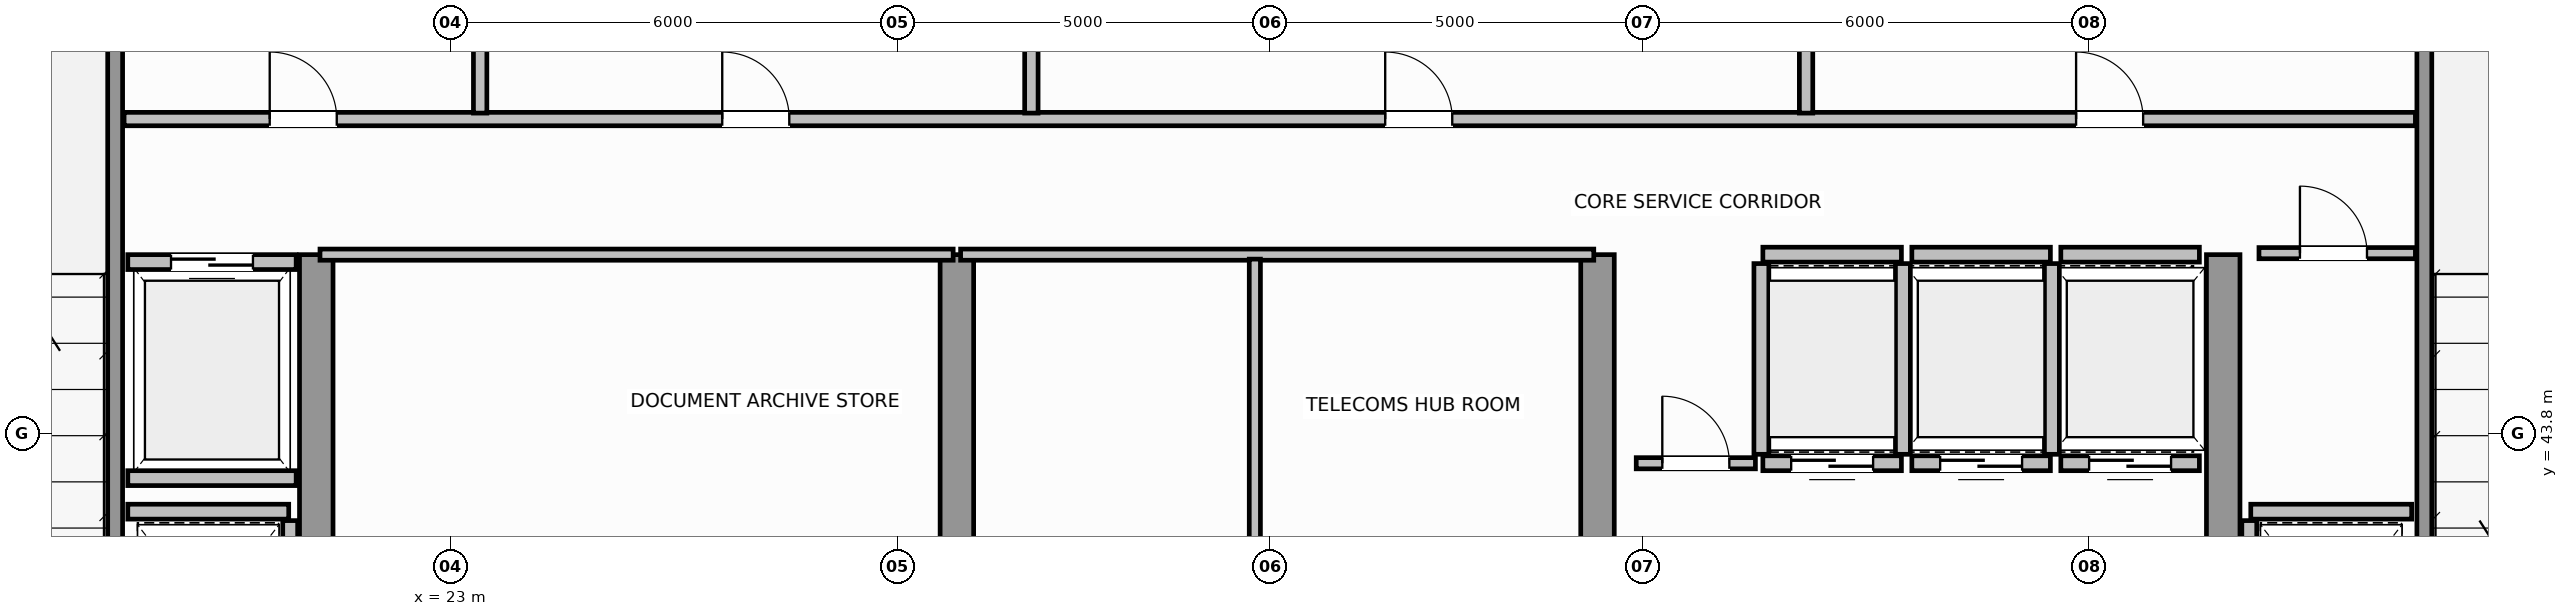
"""IFC4 building model, lengths in metres.
Left out: names, types, materials, properties, quantities, classifications, styles, units other than length and angle.
Written with IfcOpenShell. Run it as: python <this file> out.ifc"""

import sys

from ifc_helpers import new_model, si_unit, direction, frame, frame_2d, origin, place, context, subcontext, project, spatial, rectangle, extrude, source, transform, mapped, element, fill, save


model = new_model("IFC4")
c1 = context("Model", 3, precision=1e-05, world=origin(), true_north=direction((0.0, 1.0)))
c2 = subcontext(c1, "Body", "Model", "MODEL_VIEW")
j1 = project(units=[si_unit("LENGTHUNIT", "METRE"), si_unit("PLANEANGLEUNIT", "RADIAN")], contexts=[c1])
p1 = place(None, origin())
s1 = spatial("IfcSite", under=j1, at=p1, CompositionType="ELEMENT")
p2 = place(p1, origin())
s2 = spatial("IfcBuilding", under=s1, at=p2, CompositionType="ELEMENT")
p3 = place(p2, frame((0.0, 0.0, 299.2)))
s3 = spatial("IfcBuildingStorey", under=s2, at=p3, CompositionType="ELEMENT", Elevation=299.2)
for number, where, z_axis, x_axis in (
    (1, (21.2, 36.745, 0.0), (0.0, 0.0, 1.0), (0.0, 1.0, 0.0)),
    (2, (29.8, 36.745, 0.0), (0.0, 0.0, 1.0), (0.0, 1.0, 0.0)),
    (3, (38.4, 36.745, 0.0), (0.0, 0.0, 1.0), (0.0, 1.0, 0.0)),
    (4, (46.8, 36.745, 0.0), (0.0, 0.0, 1.0), (0.0, 1.0, 0.0)),
):
    element("IfcWall", number, at=place(p3, frame(where, z_axis=z_axis, x_axis=x_axis)), inside=s3, PredefinedType="SHEAR", context=c2, shape_type="SweptSolid", body=[
        extrude(rectangle(XDim=9.455, YDim=0.45, at=frame_2d((4.728, 0.0))), origin(), (0.0, 0.0, 1.0), 4.6),
    ])
for number, where, z_axis, x_axis in (
    (5, (18.5, 39.96, 0.0), (0.0, 0.0, 1.0), (0.0, 1.0, 0.0)),
    (6, (49.5, 39.96, 0.0), (0.0, 0.0, 1.0), (0.0, 1.0, 0.0)),
):
    element("IfcWall", number, at=place(p3, frame(where, z_axis=z_axis, x_axis=x_axis)), inside=s3, PredefinedType="SOLIDWALL", context=c2, shape_type="SweptSolid", body=[
        extrude(rectangle(XDim=9.93, YDim=0.2, at=frame_2d((4.965, 0.0))), origin(), (0.0, 0.0, 1.0), 4.6),
    ])
p4 = place(p3, frame((40.62, 43.4, 0.0), z_axis=(0.0, 0.0, 1.0), x_axis=(1.0, 0.0, 0.0)))
e7 = element("IfcWall", 7, at=p4, inside=s3, PredefinedType="SOLIDWALL", context=c2, shape_type="SweptSolid", body=[
    extrude(rectangle(XDim=1.86, YDim=0.2, at=frame_2d((0.93, 0.0))), origin(), (0.0, 0.0, 1.0), 4.3),
])
p5 = place(p4, frame((0.38, 0.0, 0.0)))
e8 = element("IfcOpeningElement", 8, at=p5, cuts=e7, PredefinedType="OPENING", context=c2, shape_type="SweptSolid", body=[
    extrude(rectangle(XDim=1.1, YDim=2.15, at=frame_2d((0.55, 1.075))), frame((0.0, 0.11, 0.0), z_axis=(0.0, -1.0, 0.0), x_axis=(1.0, 0.0, 0.0)), (0.0, 0.0, 1.0), 0.22),
])
p6 = place(p3, frame((40.62, 46.2, 0.0), z_axis=(0.0, 0.0, 1.0), x_axis=(1.0, 0.0, 0.0)))
e9 = element("IfcWall", 9, at=p6, inside=s3, PredefinedType="SOLIDWALL", context=c2, shape_type="SweptSolid", body=[
    extrude(rectangle(XDim=1.86, YDim=0.2, at=frame_2d((0.93, 0.0))), origin(), (0.0, 0.0, 1.0), 4.3),
])
for number, where, z_axis, x_axis in (
    (10, (40.6, 43.52, 0.0), (0.0, 0.0, 1.0), (0.0, 1.0, 0.0)),
    (11, (42.5, 43.52, 0.0), (0.0, 0.0, 1.0), (0.0, 1.0, 0.0)),
):
    element("IfcWall", number, at=place(p3, frame(where, z_axis=z_axis, x_axis=x_axis)), inside=s3, PredefinedType="SOLIDWALL", context=c2, shape_type="SweptSolid", body=[
        extrude(rectangle(XDim=2.56, YDim=0.2, at=frame_2d((1.28, 0.0))), origin(), (0.0, 0.0, 1.0), 4.3),
    ])
p7 = place(p3, frame((42.62, 43.4, 0.0), z_axis=(0.0, 0.0, 1.0), x_axis=(1.0, 0.0, 0.0)))
e12 = element("IfcWall", 12, at=p7, inside=s3, PredefinedType="SOLIDWALL", context=c2, shape_type="SweptSolid", body=[
    extrude(rectangle(XDim=1.86, YDim=0.2, at=frame_2d((0.93, 0.0))), origin(), (0.0, 0.0, 1.0), 4.3),
])
p8 = place(p7, frame((0.38, 0.0, 0.0)))
e13 = element("IfcOpeningElement", 13, at=p8, cuts=e12, PredefinedType="OPENING", context=c2, shape_type="SweptSolid", body=[
    extrude(rectangle(XDim=1.1, YDim=2.15, at=frame_2d((0.55, 1.075))), frame((0.0, 0.11, 0.0), z_axis=(0.0, -1.0, 0.0), x_axis=(1.0, 0.0, 0.0)), (0.0, 0.0, 1.0), 0.22),
])
p9 = place(p3, frame((42.62, 46.2, 0.0), z_axis=(0.0, 0.0, 1.0), x_axis=(1.0, 0.0, 0.0)))
e14 = element("IfcWall", 14, at=p9, inside=s3, PredefinedType="SOLIDWALL", context=c2, shape_type="SweptSolid", body=[
    extrude(rectangle(XDim=1.86, YDim=0.2, at=frame_2d((0.93, 0.0))), origin(), (0.0, 0.0, 1.0), 4.3),
])
p10 = place(p3, frame((44.5, 43.52, 0.0), z_axis=(0.0, 0.0, 1.0), x_axis=(0.0, 1.0, 0.0)))
e15 = element("IfcWall", 15, at=p10, inside=s3, PredefinedType="SOLIDWALL", context=c2, shape_type="SweptSolid", body=[
    extrude(rectangle(XDim=2.56, YDim=0.2, at=frame_2d((1.28, 0.0))), origin(), (0.0, 0.0, 1.0), 3.09),
])
p11 = place(p3, frame((44.62, 43.4, 0.0), z_axis=(0.0, 0.0, 1.0), x_axis=(1.0, 0.0, 0.0)))
e16 = element("IfcWall", 16, at=p11, inside=s3, PredefinedType="SOLIDWALL", context=c2, shape_type="SweptSolid", body=[
    extrude(rectangle(XDim=1.86, YDim=0.2, at=frame_2d((0.93, 0.0))), origin(), (0.0, 0.0, 1.0), 4.3),
])
p12 = place(p11, frame((0.38, 0.0, 0.0)))
e17 = element("IfcOpeningElement", 17, at=p12, cuts=e16, PredefinedType="OPENING", context=c2, shape_type="SweptSolid", body=[
    extrude(rectangle(XDim=1.1, YDim=2.15, at=frame_2d((0.55, 1.075))), frame((0.0, 0.11, 0.0), z_axis=(0.0, -1.0, 0.0), x_axis=(1.0, 0.0, 0.0)), (0.0, 0.0, 1.0), 0.22),
])
p13 = place(p3, frame((44.62, 46.2, 0.0), z_axis=(0.0, 0.0, 1.0), x_axis=(1.0, 0.0, 0.0)))
e18 = element("IfcWall", 18, at=p13, inside=s3, PredefinedType="SOLIDWALL", context=c2, shape_type="SweptSolid", body=[
    extrude(rectangle(XDim=1.86, YDim=0.2, at=frame_2d((0.93, 0.0))), origin(), (0.0, 0.0, 1.0), 4.3),
])
p14 = place(p3, frame((18.67, 46.1, 0.0), z_axis=(0.0, 0.0, 1.0), x_axis=(1.0, 0.0, 0.0)))
e19 = element("IfcWall", 19, at=p14, inside=s3, PredefinedType="SOLIDWALL", context=c2, shape_type="SweptSolid", body=[
    extrude(rectangle(XDim=2.26, YDim=0.2, at=frame_2d((1.13, 0.0))), origin(), (0.0, 0.0, 1.0), 4.3),
])
p15 = place(p14, frame((0.58, 0.0, 0.0)))
e20 = element("IfcOpeningElement", 20, at=p15, cuts=e19, PredefinedType="OPENING", context=c2, shape_type="SweptSolid", body=[
    extrude(rectangle(XDim=1.1, YDim=2.15, at=frame_2d((0.55, 1.075))), frame((0.0, 0.11, 0.0), z_axis=(0.0, -1.0, 0.0), x_axis=(1.0, 0.0, 0.0)), (0.0, 0.0, 1.0), 0.22),
])
p16 = place(p3, frame((18.67, 43.2, 0.0), z_axis=(0.0, 0.0, 1.0), x_axis=(1.0, 0.0, 0.0)))
e21 = element("IfcWall", 21, at=p16, inside=s3, PredefinedType="SOLIDWALL", context=c2, shape_type="SweptSolid", body=[
    extrude(rectangle(XDim=2.26, YDim=0.2, at=frame_2d((1.13, 0.0))), origin(), (0.0, 0.0, 1.0), 4.3),
])
p17 = place(p3, frame((18.67, 42.75, 0.0), z_axis=(0.0, 0.0, 1.0), x_axis=(1.0, 0.0, 0.0)))
e22 = element("IfcWall", 22, at=p17, inside=s3, PredefinedType="SOLIDWALL", context=c2, shape_type="SweptSolid", body=[
    extrude(rectangle(XDim=2.16, YDim=0.2, at=frame_2d((1.08, 0.0))), origin(), (0.0, 0.0, 1.0), 4.3),
])
p18 = place(p3, frame((20.85, 40.07, 0.0), z_axis=(0.0, 0.0, 1.0), x_axis=(0.0, 1.0, 0.0)))
e23 = element("IfcWall", 23, at=p18, inside=s3, PredefinedType="SOLIDWALL", context=c2, shape_type="SweptSolid", body=[
    extrude(rectangle(XDim=2.56, YDim=0.2, at=frame_2d((1.28, 0.0))), origin(), (0.0, 0.0, 1.0), 4.3),
])
p19 = place(p3, frame((47.17, 42.75, 0.0), z_axis=(0.0, 0.0, 1.0), x_axis=(1.0, 0.0, 0.0)))
e24 = element("IfcWall", 24, at=p19, inside=s3, PredefinedType="SOLIDWALL", context=c2, shape_type="SweptSolid", body=[
    extrude(rectangle(XDim=2.16, YDim=0.2, at=frame_2d((1.08, 0.0))), origin(), (0.0, 0.0, 1.0), 4.3),
])
p20 = place(p3, frame((47.15, 40.07, 0.0), z_axis=(0.0, 0.0, 1.0), x_axis=(0.0, 1.0, 0.0)))
e25 = element("IfcWall", 25, at=p20, inside=s3, PredefinedType="SOLIDWALL", context=c2, shape_type="SweptSolid", body=[
    extrude(rectangle(XDim=2.56, YDim=0.2, at=frame_2d((1.28, 0.0))), origin(), (0.0, 0.0, 1.0), 4.3),
])
for number, where, z_axis, x_axis in (
    (26, (21.25, 46.2, 0.0), (0.0, 0.0, 1.0), (1.0, 0.0, 0.0)),
    (27, (29.85, 46.2, 0.0), (0.0, 0.0, 1.0), (1.0, 0.0, 0.0)),
):
    element("IfcWall", number, at=place(p3, frame(where, z_axis=z_axis, x_axis=x_axis)), inside=s3, PredefinedType="PARTITIONING", context=c2, shape_type="SweptSolid", body=[
        extrude(rectangle(XDim=8.5, YDim=0.15, at=frame_2d((4.25, 0.0))), origin(), (0.0, 0.0, 1.0), 4.3),
    ])
p21 = place(p3, frame((33.8, 36.56, 0.0), z_axis=(0.0, 0.0, 1.0), x_axis=(0.0, 1.0, 0.0)))
e28 = element("IfcWall", 28, at=p21, inside=s3, PredefinedType="PARTITIONING", context=c2, shape_type="SweptSolid", body=[
    extrude(rectangle(XDim=9.58, YDim=0.15, at=frame_2d((4.79, 0.0))), origin(), (0.0, 0.0, 1.0), 4.3),
])
p22 = place(p21, frame((4.2, 0.0, 0.0)))
e29 = element("IfcOpeningElement", 29, at=p22, cuts=e28, PredefinedType="OPENING", context=c2, shape_type="SweptSolid", body=[
    extrude(rectangle(XDim=0.9, YDim=2.1, at=frame_2d((0.45, 1.05))), frame((0.0, 0.085, 0.0), z_axis=(0.0, -1.0, 0.0), x_axis=(1.0, 0.0, 0.0)), (0.0, 0.0, 1.0), 0.17),
])
p23 = place(p3, frame((47.28, 46.22, 0.0), z_axis=(0.0, 0.0, 1.0), x_axis=(1.0, 0.0, 0.0)))
e30 = element("IfcWall", 30, at=p23, inside=s3, PredefinedType="PARTITIONING", context=c2, shape_type="SweptSolid", body=[
    extrude(rectangle(XDim=2.1, YDim=0.15, at=frame_2d((1.05, 0.0))), origin(), (0.0, 0.0, 1.0), 4.3),
])
p24 = place(p23, frame((0.55, 0.0, 0.0)))
e31 = element("IfcOpeningElement", 31, at=p24, cuts=e30, PredefinedType="OPENING", context=c2, shape_type="SweptSolid", body=[
    extrude(rectangle(XDim=0.9, YDim=2.1, at=frame_2d((0.45, 1.05))), frame((0.0, 0.085, 0.0), z_axis=(0.0, -1.0, 0.0), x_axis=(1.0, 0.0, 0.0)), (0.0, 0.0, 1.0), 0.17),
])
p25 = place(p3, frame((38.92, 43.4, 0.0), z_axis=(0.0, 0.0, 1.0), x_axis=(1.0, 0.0, 0.0)))
e32 = element("IfcWall", 32, at=p25, inside=s3, PredefinedType="PARTITIONING", context=c2, shape_type="SweptSolid", body=[
    extrude(rectangle(XDim=1.6, YDim=0.15, at=frame_2d((0.8, 0.0))), origin(), (0.0, 0.0, 1.0), 4.3),
])
p26 = place(p25, frame((0.35, 0.0, 0.0)))
e33 = element("IfcOpeningElement", 33, at=p26, cuts=e32, PredefinedType="OPENING", context=c2, shape_type="SweptSolid", body=[
    extrude(rectangle(XDim=0.9, YDim=2.1, at=frame_2d((0.45, 1.05))), frame((0.0, 0.085, 0.0), z_axis=(0.0, -1.0, 0.0), x_axis=(1.0, 0.0, 0.0)), (0.0, 0.0, 1.0), 0.17),
])
p27 = place(p3, frame((18.62, 48.02, 0.0), z_axis=(0.0, 0.0, 1.0), x_axis=(1.0, 0.0, 0.0)))
e34 = element("IfcWall", 34, at=p27, inside=s3, PredefinedType="PLUMBINGWALL", context=c2, shape_type="SweptSolid", body=[
    extrude(rectangle(XDim=30.76, YDim=0.18, at=frame_2d((15.38, 0.0))), origin(), (0.0, 0.0, 1.0), 4.3),
])
p28 = place(p27, frame((1.955, 0.0, 0.0)))
e35 = element("IfcOpeningElement", 35, at=p28, cuts=e34, PredefinedType="OPENING", context=c2, shape_type="SweptSolid", body=[
    extrude(rectangle(XDim=0.9, YDim=2.15, at=frame_2d((0.45, 1.075))), frame((0.0, 0.1, 0.0), z_axis=(0.0, -1.0, 0.0), x_axis=(1.0, 0.0, 0.0)), (0.0, 0.0, 1.0), 0.2),
])
p29 = place(p27, frame((8.03, 0.0, 0.0)))
e36 = element("IfcOpeningElement", 36, at=p29, cuts=e34, PredefinedType="OPENING", context=c2, shape_type="SweptSolid", body=[
    extrude(rectangle(XDim=0.9, YDim=2.15, at=frame_2d((0.45, 1.075))), frame((0.0, 0.1, 0.0), z_axis=(0.0, -1.0, 0.0), x_axis=(1.0, 0.0, 0.0)), (0.0, 0.0, 1.0), 0.2),
])
p30 = place(p27, frame((16.93, 0.0, 0.0)))
e37 = element("IfcOpeningElement", 37, at=p30, cuts=e34, PredefinedType="OPENING", context=c2, shape_type="SweptSolid", body=[
    extrude(rectangle(XDim=0.9, YDim=2.15, at=frame_2d((0.45, 1.075))), frame((0.0, 0.1, 0.0), z_axis=(0.0, -1.0, 0.0), x_axis=(1.0, 0.0, 0.0)), (0.0, 0.0, 1.0), 0.2),
])
p31 = place(p27, frame((26.205, 0.0, 0.0)))
e38 = element("IfcOpeningElement", 38, at=p31, cuts=e34, PredefinedType="OPENING", context=c2, shape_type="SweptSolid", body=[
    extrude(rectangle(XDim=0.9, YDim=2.15, at=frame_2d((0.45, 1.075))), frame((0.0, 0.1, 0.0), z_axis=(0.0, -1.0, 0.0), x_axis=(1.0, 0.0, 0.0)), (0.0, 0.0, 1.0), 0.2),
])
p32 = place(p3, frame((23.4, 48.1, 0.0), z_axis=(0.0, 0.0, 1.0), x_axis=(0.0, 1.0, 0.0)))
e39 = element("IfcWall", 39, at=p32, inside=s3, PredefinedType="PLUMBINGWALL", context=c2, shape_type="SweptSolid", body=[
    extrude(rectangle(XDim=2.43, YDim=0.18, at=frame_2d((1.215, 0.0))), origin(), (0.0, 0.0, 1.0), 3.09),
])
for number, where, z_axis, x_axis in (
    (40, (30.8, 48.1, 0.0), (0.0, 0.0, 1.0), (0.0, 1.0, 0.0)),
    (41, (41.2, 48.1, 0.0), (0.0, 0.0, 1.0), (0.0, 1.0, 0.0)),
):
    element("IfcWall", number, at=place(p3, frame(where, z_axis=z_axis, x_axis=x_axis)), inside=s3, PredefinedType="PLUMBINGWALL", context=c2, shape_type="SweptSolid", body=[
        extrude(rectangle(XDim=2.43, YDim=0.18, at=frame_2d((1.215, 0.0))), origin(), (0.0, 0.0, 1.0), 4.3),
    ])
m1 = source(origin(), c2, "Body", "SweptSolid", [
    extrude(rectangle(XDim=1.1, YDim=2.15, at=frame_2d((0.55, 1.075))), frame((0.0, 0.025, 0.0), z_axis=(0.0, -1.0, 0.0), x_axis=(1.0, 0.0, 0.0)), (0.0, 0.0, 1.0), 0.05),
])
p33 = place(p5, origin())
e42 = element("IfcDoor", 42, at=p33, inside=s3, OperationType="DOUBLE_DOOR_SLIDING", PredefinedType="DOOR", context=c2, shape_type="MappedRepresentation", body=[
    mapped(m1, transform((0.0, 0.0, 0.0), scale=1.0)),
])
fill(e8, e42)
p34 = place(p8, origin())
e43 = element("IfcDoor", 43, at=p34, inside=s3, OperationType="DOUBLE_DOOR_SLIDING", PredefinedType="DOOR", context=c2, shape_type="MappedRepresentation", body=[
    mapped(m1, transform((0.0, 0.0, 0.0), scale=1.0)),
])
fill(e13, e43)
p35 = place(p12, origin())
e44 = element("IfcDoor", 44, at=p35, inside=s3, OperationType="DOUBLE_DOOR_SLIDING", PredefinedType="DOOR", context=c2, shape_type="MappedRepresentation", body=[
    mapped(m1, transform((0.0, 0.0, 0.0), scale=1.0)),
])
fill(e17, e44)
p36 = place(p15, origin())
e45 = element("IfcDoor", 45, at=p36, inside=s3, OperationType="DOUBLE_DOOR_SLIDING", PredefinedType="DOOR", context=c2, shape_type="MappedRepresentation", body=[
    mapped(m1, transform((0.0, 0.0, 0.0), scale=1.0)),
])
fill(e20, e45)
m2 = source(origin(), c2, "Body", "SweptSolid", [
    extrude(rectangle(XDim=0.9, YDim=2.1, at=frame_2d((0.45, 1.05))), frame((0.0, 0.025, 0.0), z_axis=(0.0, -1.0, 0.0), x_axis=(1.0, 0.0, 0.0)), (0.0, 0.0, 1.0), 0.05),
])
p37 = place(p24, origin())
e46 = element("IfcDoor", 46, at=p37, inside=s3, OperationType="SINGLE_SWING_RIGHT", PredefinedType="DOOR", context=c2, shape_type="MappedRepresentation", body=[
    mapped(m2, transform((0.0, 0.0, 0.0), scale=1.0)),
])
fill(e31, e46)
p38 = place(p26, origin())
e47 = element("IfcDoor", 47, at=p38, inside=s3, OperationType="SINGLE_SWING_LEFT", PredefinedType="DOOR", context=c2, shape_type="MappedRepresentation", body=[
    mapped(m2, transform((0.0, 0.0, 0.0), scale=1.0)),
])
fill(e33, e47)
m3 = source(origin(), c2, "Body", "SweptSolid", [
    extrude(rectangle(XDim=0.9, YDim=2.15, at=frame_2d((0.45, 1.075))), frame((0.0, 0.025, 0.0), z_axis=(0.0, -1.0, 0.0), x_axis=(1.0, 0.0, 0.0)), (0.0, 0.0, 1.0), 0.05),
])
p39 = place(p28, origin())
e48 = element("IfcDoor", 48, at=p39, inside=s3, OperationType="SINGLE_SWING_LEFT", PredefinedType="DOOR", context=c2, shape_type="MappedRepresentation", body=[
    mapped(m3, transform((0.0, 0.0, 0.0), scale=1.0)),
])
fill(e35, e48)
p40 = place(p29, origin())
e49 = element("IfcDoor", 49, at=p40, inside=s3, OperationType="SINGLE_SWING_RIGHT", PredefinedType="DOOR", context=c2, shape_type="MappedRepresentation", body=[
    mapped(m3, transform((0.0, 0.0, 0.0), scale=1.0)),
])
fill(e36, e49)
p41 = place(p30, origin())
e50 = element("IfcDoor", 50, at=p41, inside=s3, OperationType="SINGLE_SWING_LEFT", PredefinedType="DOOR", context=c2, shape_type="MappedRepresentation", body=[
    mapped(m3, transform((0.0, 0.0, 0.0), scale=1.0)),
])
fill(e37, e50)
p42 = place(p31, origin())
e51 = element("IfcDoor", 51, at=p42, inside=s3, OperationType="SINGLE_SWING_RIGHT", PredefinedType="DOOR", context=c2, shape_type="MappedRepresentation", body=[
    mapped(m3, transform((0.0, 0.0, 0.0), scale=1.0)),
])
fill(e38, e51)
save(model, sys.argv[1])
